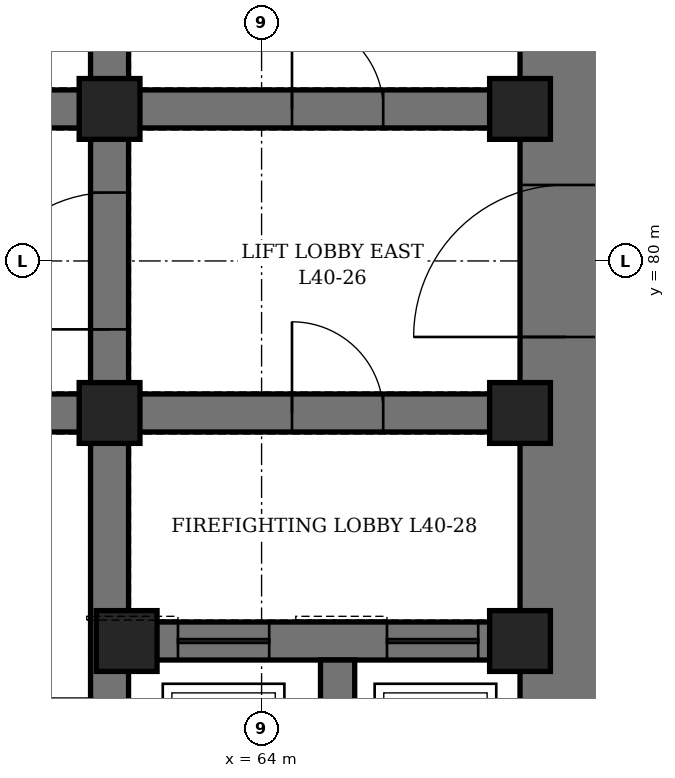
"""IFC4 building model, lengths in metres.
Left out: names, types, materials, properties, quantities, classifications, styles, units other than length and angle.
Written with IfcOpenShell. Run it as: python <this file> out.ifc"""

import sys

from ifc_helpers import new_model, si_unit, direction, frame, frame_2d, origin, origin_2d, place, context, subcontext, project, spatial, rectangle, hollow_rectangle, extrude, element, fill, save


model = new_model("IFC4")
c1 = context("Model", 3, precision=1e-05, world=origin(), true_north=direction((0.0, 1.0)))
c2 = subcontext(c1, "Body", "Model", "MODEL_VIEW")
j1 = project(units=[si_unit("LENGTHUNIT", "METRE"), si_unit("PLANEANGLEUNIT", "RADIAN")], contexts=[c1])
p1 = place(None, origin())
s1 = spatial("IfcSite", under=j1, at=p1, CompositionType="ELEMENT")
p2 = place(p1, origin())
s2 = spatial("IfcBuilding", under=s1, at=p2, CompositionType="ELEMENT")
p3 = place(p2, frame((0.0, 0.0, 181.3)))
s3 = spatial("IfcBuildingStorey", under=s2, at=p3, CompositionType="ELEMENT", Elevation=181.3)
p4 = place(p3, frame((68.0, 70.4, 0.0), z_axis=(0.0, 0.0, 1.0), x_axis=(0.0, 1.0, 0.0)))
e1 = element("IfcWall", 1, at=p4, inside=s3, PredefinedType="SHEAR", context=c2, shape_type="SweptSolid", body=[
    extrude(rectangle(XDim=19.2, YDim=1.2, at=frame_2d((9.6, 0.0))), origin(), (0.0, 0.0, 1.0), 4.2),
])
p5 = place(p4, frame((8.6, 0.0, 0.0)))
e2 = element("IfcOpeningElement", 2, at=p5, cuts=e1, PredefinedType="OPENING", context=c2, shape_type="SweptSolid", body=[
    extrude(rectangle(XDim=2.0, YDim=2.4, at=frame_2d((1.0, 1.2))), frame((0.0, 0.61, 0.0), z_axis=(0.0, -1.0, 0.0), x_axis=(1.0, 0.0, 0.0)), (0.0, 0.0, 1.0), 1.22),
])
p6 = place(p3, frame((62.0, 71.6, 0.0), z_axis=(0.0, 0.0, 1.0), x_axis=(0.0, 1.0, 0.0)))
e3 = element("IfcWall", 3, at=p6, inside=s3, PredefinedType="SHEAR", context=c2, shape_type="SweptSolid", body=[
    extrude(rectangle(XDim=16.8, YDim=0.5, at=frame_2d((8.4, 0.0))), origin(), (0.0, 0.0, 1.0), 4.2),
])
p7 = place(p6, frame((7.5, 0.0, 0.0)))
e4 = element("IfcOpeningElement", 4, at=p7, cuts=e3, PredefinedType="OPENING", context=c2, shape_type="SweptSolid", body=[
    extrude(rectangle(XDim=1.8, YDim=2.4, at=frame_2d((0.9, 1.2))), frame((0.0, 0.26, 0.0), z_axis=(0.0, -1.0, 0.0), x_axis=(1.0, 0.0, 0.0)), (0.0, 0.0, 1.0), 0.52),
])
p8 = place(p3, frame((62.25, 75.0, 0.0), z_axis=(0.0, 0.0, 1.0), x_axis=(1.0, 0.0, 0.0)))
e5 = element("IfcWall", 5, at=p8, inside=s3, PredefinedType="SHEAR", context=c2, shape_type="SweptSolid", body=[
    extrude(rectangle(XDim=5.15, YDim=0.5, at=frame_2d((2.575, 0.0))), origin(), (0.0, 0.0, 1.0), 4.2),
])
p9 = place(p8, frame((0.65, 0.0, 0.0)))
e6 = element("IfcOpeningElement", 6, at=p9, cuts=e5, PredefinedType="OPENING", context=c2, shape_type="SweptSolid", body=[
    extrude(rectangle(XDim=1.2, YDim=2.2, at=frame_2d((0.6, 1.1))), frame((0.0, 0.26, 0.0), z_axis=(0.0, -1.0, 0.0), x_axis=(1.0, 0.0, 0.0)), (0.0, 0.0, 1.0), 0.52),
])
p10 = place(p8, frame((3.4, 0.0, 0.0)))
e7 = element("IfcOpeningElement", 7, at=p10, cuts=e5, PredefinedType="OPENING", context=c2, shape_type="SweptSolid", body=[
    extrude(rectangle(XDim=1.2, YDim=2.2, at=frame_2d((0.6, 1.1))), frame((0.0, 0.26, 0.0), z_axis=(0.0, -1.0, 0.0), x_axis=(1.0, 0.0, 0.0)), (0.0, 0.0, 1.0), 0.52),
])
p11 = place(p3, frame((62.25, 78.0, 0.0), z_axis=(0.0, 0.0, 1.0), x_axis=(1.0, 0.0, 0.0)))
e8 = element("IfcWall", 8, at=p11, inside=s3, PredefinedType="SHEAR", context=c2, shape_type="SweptSolid", body=[
    extrude(rectangle(XDim=5.15, YDim=0.5, at=frame_2d((2.575, 0.0))), origin(), (0.0, 0.0, 1.0), 4.2),
])
p12 = place(p11, frame((2.15, 0.0, 0.0)))
e9 = element("IfcOpeningElement", 9, at=p12, cuts=e8, PredefinedType="OPENING", context=c2, shape_type="SweptSolid", body=[
    extrude(rectangle(XDim=1.2, YDim=2.1, at=frame_2d((0.6, 1.05))), frame((0.0, 0.26, 0.0), z_axis=(0.0, -1.0, 0.0), x_axis=(1.0, 0.0, 0.0)), (0.0, 0.0, 1.0), 0.52),
])
p13 = place(p3, frame((62.25, 82.0, 0.0), z_axis=(0.0, 0.0, 1.0), x_axis=(1.0, 0.0, 0.0)))
e10 = element("IfcWall", 10, at=p13, inside=s3, PredefinedType="SHEAR", context=c2, shape_type="SweptSolid", body=[
    extrude(rectangle(XDim=5.15, YDim=0.5, at=frame_2d((2.575, 0.0))), origin(), (0.0, 0.0, 1.0), 4.2),
])
p14 = place(p13, frame((2.15, 0.0, 0.0)))
e11 = element("IfcOpeningElement", 11, at=p14, cuts=e10, PredefinedType="OPENING", context=c2, shape_type="SweptSolid", body=[
    extrude(rectangle(XDim=1.2, YDim=2.1, at=frame_2d((0.6, 1.05))), frame((0.0, 0.26, 0.0), z_axis=(0.0, -1.0, 0.0), x_axis=(1.0, 0.0, 0.0)), (0.0, 0.0, 1.0), 0.52),
])
p15 = place(p3, frame((50.25, 78.0, 0.0), z_axis=(0.0, 0.0, 1.0), x_axis=(1.0, 0.0, 0.0)))
e12 = element("IfcWall", 12, at=p15, inside=s3, PredefinedType="SHEAR", context=c2, shape_type="SweptSolid", body=[
    extrude(rectangle(XDim=11.5, YDim=0.5, at=frame_2d((5.75, 0.0))), origin(), (0.0, 0.0, 1.0), 4.2),
])
p16 = place(p15, frame((0.8, 0.0, 0.0)))
e13 = element("IfcOpeningElement", 13, at=p16, cuts=e12, PredefinedType="OPENING", context=c2, shape_type="SweptSolid", body=[
    extrude(rectangle(XDim=0.9, YDim=2.1, at=frame_2d((0.45, 1.05))), frame((0.0, 0.26, 0.0), z_axis=(0.0, -1.0, 0.0), x_axis=(1.0, 0.0, 0.0)), (0.0, 0.0, 1.0), 0.52),
])
p17 = place(p15, frame((3.8, 0.0, 0.0)))
e14 = element("IfcOpeningElement", 14, at=p17, cuts=e12, PredefinedType="OPENING", context=c2, shape_type="SweptSolid", body=[
    extrude(rectangle(XDim=0.9, YDim=2.1, at=frame_2d((0.45, 1.05))), frame((0.0, 0.26, 0.0), z_axis=(0.0, -1.0, 0.0), x_axis=(1.0, 0.0, 0.0)), (0.0, 0.0, 1.0), 0.52),
])
p18 = place(p15, frame((6.8, 0.0, 0.0)))
e15 = element("IfcOpeningElement", 15, at=p18, cuts=e12, PredefinedType="OPENING", context=c2, shape_type="SweptSolid", body=[
    extrude(rectangle(XDim=0.9, YDim=2.1, at=frame_2d((0.45, 1.05))), frame((0.0, 0.26, 0.0), z_axis=(0.0, -1.0, 0.0), x_axis=(1.0, 0.0, 0.0)), (0.0, 0.0, 1.0), 0.52),
])
p19 = place(p15, frame((9.8, 0.0, 0.0)))
e16 = element("IfcOpeningElement", 16, at=p19, cuts=e12, PredefinedType="OPENING", context=c2, shape_type="SweptSolid", body=[
    extrude(rectangle(XDim=0.9, YDim=2.1, at=frame_2d((0.45, 1.05))), frame((0.0, 0.26, 0.0), z_axis=(0.0, -1.0, 0.0), x_axis=(1.0, 0.0, 0.0)), (0.0, 0.0, 1.0), 0.52),
])
p20 = place(p3, frame((50.25, 82.0, 0.0), z_axis=(0.0, 0.0, 1.0), x_axis=(1.0, 0.0, 0.0)))
e17 = element("IfcWall", 17, at=p20, inside=s3, PredefinedType="SHEAR", context=c2, shape_type="SweptSolid", body=[
    extrude(rectangle(XDim=11.5, YDim=0.5, at=frame_2d((5.75, 0.0))), origin(), (0.0, 0.0, 1.0), 4.2),
])
p21 = place(p20, frame((0.8, 0.0, 0.0)))
e18 = element("IfcOpeningElement", 18, at=p21, cuts=e17, PredefinedType="OPENING", context=c2, shape_type="SweptSolid", body=[
    extrude(rectangle(XDim=0.9, YDim=2.1, at=frame_2d((0.45, 1.05))), frame((0.0, 0.26, 0.0), z_axis=(0.0, -1.0, 0.0), x_axis=(1.0, 0.0, 0.0)), (0.0, 0.0, 1.0), 0.52),
])
p22 = place(p20, frame((3.8, 0.0, 0.0)))
e19 = element("IfcOpeningElement", 19, at=p22, cuts=e17, PredefinedType="OPENING", context=c2, shape_type="SweptSolid", body=[
    extrude(rectangle(XDim=0.9, YDim=2.1, at=frame_2d((0.45, 1.05))), frame((0.0, 0.26, 0.0), z_axis=(0.0, -1.0, 0.0), x_axis=(1.0, 0.0, 0.0)), (0.0, 0.0, 1.0), 0.52),
])
p23 = place(p20, frame((6.8, 0.0, 0.0)))
e20 = element("IfcOpeningElement", 20, at=p23, cuts=e17, PredefinedType="OPENING", context=c2, shape_type="SweptSolid", body=[
    extrude(rectangle(XDim=0.9, YDim=2.1, at=frame_2d((0.45, 1.05))), frame((0.0, 0.26, 0.0), z_axis=(0.0, -1.0, 0.0), x_axis=(1.0, 0.0, 0.0)), (0.0, 0.0, 1.0), 0.52),
])
p24 = place(p20, frame((9.8, 0.0, 0.0)))
e21 = element("IfcOpeningElement", 21, at=p24, cuts=e17, PredefinedType="OPENING", context=c2, shape_type="SweptSolid", body=[
    extrude(rectangle(XDim=0.9, YDim=2.1, at=frame_2d((0.45, 1.05))), frame((0.0, 0.26, 0.0), z_axis=(0.0, -1.0, 0.0), x_axis=(1.0, 0.0, 0.0)), (0.0, 0.0, 1.0), 0.52),
])
p25 = place(p3, frame((65.0, 71.6, 0.0), z_axis=(0.0, 0.0, 1.0), x_axis=(0.0, 1.0, 0.0)))
e22 = element("IfcWall", 22, at=p25, inside=s3, PredefinedType="SHEAR", context=c2, shape_type="SweptSolid", body=[
    extrude(rectangle(XDim=3.15, YDim=0.45, at=frame_2d((1.575, 0.0))), origin(), (0.0, 0.0, 1.0), 4.2),
])
for number, where, z_axis, x_axis in (
    (23, (62.0, 78.0, 0.0), (0.0, 0.0, 1.0), (1.0, 0.0, 0.0)),
    (24, (62.0, 82.0, 0.0), (0.0, 0.0, 1.0), (1.0, 0.0, 0.0)),
    (25, (62.225, 75.0, 0.0), (0.0, 0.0, 1.0), (1.0, 0.0, 0.0)),
    (26, (67.4, 75.0, 0.0), (0.0, 0.0, 1.0), (1.0, 0.0, 0.0)),
    (27, (67.4, 78.0, 0.0), (0.0, 0.0, 1.0), (1.0, 0.0, 0.0)),
    (28, (67.4, 82.0, 0.0), (0.0, 0.0, 1.0), (1.0, 0.0, 0.0)),
):
    element("IfcColumn", number, at=place(p3, frame(where, z_axis=z_axis, x_axis=x_axis)), inside=s3, PredefinedType="COLUMN", context=c2, shape_type="SweptSolid", body=[
        extrude(hollow_rectangle(XDim=0.8, YDim=0.8, WallThickness=0.1, at=origin_2d()), origin(), (0.0, 0.0, 1.0), 4.2),
    ])
p26 = place(p14, origin())
e29 = element("IfcDoor", 29, at=p26, inside=s3, OperationType="SINGLE_SWING_LEFT", PredefinedType="DOOR", context=c2, shape_type="SweptSolid", body=[
    extrude(rectangle(XDim=1.2, YDim=2.1, at=frame_2d((0.6, 1.05))), frame((0.0, 0.25, 0.0), z_axis=(0.0, -1.0, 0.0), x_axis=(1.0, 0.0, 0.0)), (0.0, 0.0, 1.0), 0.5),
])
fill(e11, e29)
p27 = place(p5, origin())
e30 = element("IfcDoor", 30, at=p27, inside=s3, OperationType="DOUBLE_DOOR_SINGLE_SWING", PredefinedType="DOOR", context=c2, shape_type="SweptSolid", body=[
    extrude(rectangle(XDim=2.0, YDim=2.4, at=frame_2d((1.0, 1.2))), frame((0.0, 0.35, 0.0), z_axis=(0.0, -1.0, 0.0), x_axis=(1.0, 0.0, 0.0)), (0.0, 0.0, 1.0), 0.7),
])
fill(e2, e30)
p28 = place(p7, origin())
e31 = element("IfcDoor", 31, at=p28, inside=s3, OperationType="DOUBLE_DOOR_SINGLE_SWING", PredefinedType="DOOR", context=c2, shape_type="SweptSolid", body=[
    extrude(rectangle(XDim=1.8, YDim=2.4, at=frame_2d((0.9, 1.2))), frame((0.0, 0.25, 0.0), z_axis=(0.0, -1.0, 0.0), x_axis=(1.0, 0.0, 0.0)), (0.0, 0.0, 1.0), 0.5),
])
fill(e4, e31)
p29 = place(p12, origin())
e32 = element("IfcDoor", 32, at=p29, inside=s3, OperationType="SINGLE_SWING_RIGHT", PredefinedType="DOOR", context=c2, shape_type="SweptSolid", body=[
    extrude(rectangle(XDim=1.2, YDim=2.1, at=frame_2d((0.6, 1.05))), frame((0.0, 0.25, 0.0), z_axis=(0.0, -1.0, 0.0), x_axis=(1.0, 0.0, 0.0)), (0.0, 0.0, 1.0), 0.5),
])
fill(e9, e32)
p30 = place(p9, origin())
e33 = element("IfcDoor", 33, at=p30, inside=s3, OperationType="SLIDING_TO_LEFT", PredefinedType="DOOR", context=c2, shape_type="SweptSolid", body=[
    extrude(rectangle(XDim=1.2, YDim=2.2, at=frame_2d((0.6, 1.1))), frame((0.0, 0.25, 0.0), z_axis=(0.0, -1.0, 0.0), x_axis=(1.0, 0.0, 0.0)), (0.0, 0.0, 1.0), 0.5),
])
fill(e6, e33)
p31 = place(p10, origin())
e34 = element("IfcDoor", 34, at=p31, inside=s3, OperationType="SLIDING_TO_LEFT", PredefinedType="DOOR", context=c2, shape_type="SweptSolid", body=[
    extrude(rectangle(XDim=1.2, YDim=2.2, at=frame_2d((0.6, 1.1))), frame((0.0, 0.25, 0.0), z_axis=(0.0, -1.0, 0.0), x_axis=(1.0, 0.0, 0.0)), (0.0, 0.0, 1.0), 0.5),
])
fill(e7, e34)
save(model, sys.argv[1])
